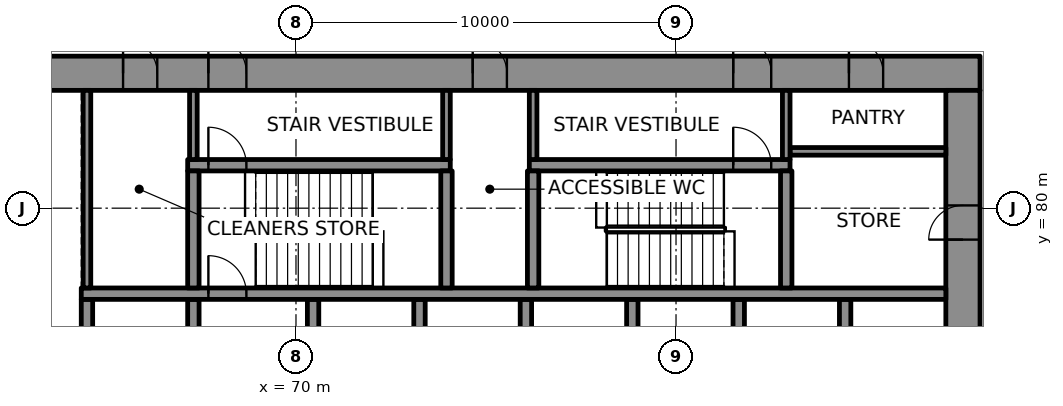
"""IFC4 building model, lengths in metres.
Left out: names, types, materials, properties, quantities, classifications, styles, units other than length and angle.
Written with IfcOpenShell. Run it as: python <this file> out.ifc"""

import sys

from ifc_helpers import new_model, si_unit, direction, frame, frame_2d, origin, place, context, subcontext, project, spatial, rectangle, extrude, element, fill, save


model = new_model("IFC4")
c1 = context("Model", 3, precision=1e-05, world=origin(), true_north=direction((0.0, 1.0)))
c2 = subcontext(c1, "Body", "Model", "MODEL_VIEW")
j1 = project(units=[si_unit("LENGTHUNIT", "METRE"), si_unit("PLANEANGLEUNIT", "RADIAN")], contexts=[c1])
p1 = place(None, origin())
s1 = spatial("IfcSite", under=j1, at=p1, CompositionType="ELEMENT")
p2 = place(p1, origin())
s2 = spatial("IfcBuilding", under=s1, at=p2, CompositionType="ELEMENT")
p3 = place(p2, frame((0.0, 0.0, 61.0)))
s3 = spatial("IfcBuildingStorey", under=s2, at=p3, CompositionType="ELEMENT", Elevation=61.0)
p4 = place(p3, frame((62.0, 83.55, 0.0), z_axis=(0.0, 0.0, 1.0), x_axis=(1.0, 0.0, 0.0)))
e1 = element("IfcWall", 1, at=p4, inside=s3, PredefinedType="SHEAR", context=c2, shape_type="SweptSolid", body=[
    extrude(rectangle(XDim=26.0, YDim=0.9, at=frame_2d((13.0, 0.0))), origin(), (0.0, 0.0, 1.0), 4.0),
])
p5 = place(p4, frame((5.695, 0.0, 0.0)))
e2 = element("IfcOpeningElement", 2, at=p5, cuts=e1, PredefinedType="OPENING", context=c2, shape_type="SweptSolid", body=[
    extrude(rectangle(XDim=1.0, YDim=2.1, at=frame_2d((0.5, 1.05))), frame((0.0, 0.46, 0.0), z_axis=(0.0, -1.0, 0.0), x_axis=(1.0, 0.0, 0.0)), (0.0, 0.0, 1.0), 0.92),
])
p6 = place(p4, frame((19.505, 0.0, 0.0)))
e3 = element("IfcOpeningElement", 3, at=p6, cuts=e1, PredefinedType="OPENING", context=c2, shape_type="SweptSolid", body=[
    extrude(rectangle(XDim=1.0, YDim=2.1, at=frame_2d((0.5, 1.05))), frame((0.0, 0.46, 0.0), z_axis=(0.0, -1.0, 0.0), x_axis=(1.0, 0.0, 0.0)), (0.0, 0.0, 1.0), 0.92),
])
p7 = place(p4, frame((3.45, 0.0, 0.0)))
e4 = element("IfcOpeningElement", 4, at=p7, cuts=e1, PredefinedType="OPENING", context=c2, shape_type="SweptSolid", body=[
    extrude(rectangle(XDim=0.9, YDim=2.1, at=frame_2d((0.45, 1.05))), frame((0.0, 0.46, 0.0), z_axis=(0.0, -1.0, 0.0), x_axis=(1.0, 0.0, 0.0)), (0.0, 0.0, 1.0), 0.92),
])
p8 = place(p4, frame((12.65, 0.0, 0.0)))
e5 = element("IfcOpeningElement", 5, at=p8, cuts=e1, PredefinedType="OPENING", context=c2, shape_type="SweptSolid", body=[
    extrude(rectangle(XDim=0.9, YDim=2.1, at=frame_2d((0.45, 1.05))), frame((0.0, 0.46, 0.0), z_axis=(0.0, -1.0, 0.0), x_axis=(1.0, 0.0, 0.0)), (0.0, 0.0, 1.0), 0.92),
])
p9 = place(p4, frame((22.55, 0.0, 0.0)))
e6 = element("IfcOpeningElement", 6, at=p9, cuts=e1, PredefinedType="OPENING", context=c2, shape_type="SweptSolid", body=[
    extrude(rectangle(XDim=0.9, YDim=2.1, at=frame_2d((0.45, 1.05))), frame((0.0, 0.46, 0.0), z_axis=(0.0, -1.0, 0.0), x_axis=(1.0, 0.0, 0.0)), (0.0, 0.0, 1.0), 0.92),
])
p10 = place(p3, frame((87.55, 66.9, 0.0), z_axis=(0.0, 0.0, 1.0), x_axis=(0.0, 1.0, 0.0)))
e7 = element("IfcWall", 7, at=p10, inside=s3, PredefinedType="SHEAR", context=c2, shape_type="SweptSolid", body=[
    extrude(rectangle(XDim=16.2, YDim=0.9, at=frame_2d((8.1, 0.0))), origin(), (0.0, 0.0, 1.0), 4.0),
])
p11 = place(p10, frame((5.5, 0.0, 0.0)))
e8 = element("IfcOpeningElement", 8, at=p11, cuts=e7, PredefinedType="OPENING", context=c2, shape_type="SweptSolid", body=[
    extrude(rectangle(XDim=1.8, YDim=2.1, at=frame_2d((0.9, 1.05))), frame((0.0, 0.46, 0.0), z_axis=(0.0, -1.0, 0.0), x_axis=(1.0, 0.0, 0.0)), (0.0, 0.0, 1.0), 0.92),
])
p12 = place(p10, frame((12.272, 0.0, 0.0)))
e9 = element("IfcOpeningElement", 9, at=p12, cuts=e7, PredefinedType="OPENING", context=c2, shape_type="SweptSolid", body=[
    extrude(rectangle(XDim=0.9, YDim=2.1, at=frame_2d((0.45, 1.05))), frame((0.0, 0.46, 0.0), z_axis=(0.0, -1.0, 0.0), x_axis=(1.0, 0.0, 0.0)), (0.0, 0.0, 1.0), 0.92),
])
for number, where, z_axis, x_axis in (
    (10, (64.5, 75.0, 0.0), (0.0, 0.0, 1.0), (0.0, 1.0, 0.0)),
    (11, (67.3, 75.0, 0.0), (0.0, 0.0, 1.0), (0.0, 1.0, 0.0)),
):
    element("IfcWall", number, at=place(p3, frame(where, z_axis=z_axis, x_axis=x_axis)), inside=s3, PredefinedType="SHEAR", context=c2, shape_type="SweptSolid", body=[
        extrude(rectangle(XDim=2.6, YDim=0.3, at=frame_2d((1.3, 0.0))), origin(), (0.0, 0.0, 1.0), 4.0),
    ])
p13 = place(p3, frame((70.45, 75.0, 0.0), z_axis=(0.0, 0.0, 1.0), x_axis=(0.0, 1.0, 0.0)))
e12 = element("IfcWall", 12, at=p13, inside=s3, PredefinedType="SHEAR", context=c2, shape_type="SweptSolid", body=[
    extrude(rectangle(XDim=2.6, YDim=0.3, at=frame_2d((1.3, 0.0))), origin(), (0.0, 0.0, 1.0), 4.0),
])
p14 = place(p13, frame((0.15, 0.0, 0.0)))
e13 = element("IfcOpeningElement", 13, at=p14, cuts=e12, PredefinedType="OPENING", context=c2, shape_type="SweptSolid", body=[
    extrude(rectangle(XDim=1.1, YDim=2.1, at=frame_2d((0.55, 1.05))), frame((0.0, 0.16, 0.0), z_axis=(0.0, -1.0, 0.0), x_axis=(1.0, 0.0, 0.0)), (0.0, 0.0, 1.0), 0.32),
])
for number, where, z_axis, x_axis in (
    (14, (73.25, 75.0, 0.0), (0.0, 0.0, 1.0), (0.0, 1.0, 0.0)),
    (15, (76.05, 75.0, 0.0), (0.0, 0.0, 1.0), (0.0, 1.0, 0.0)),
    (16, (78.85, 75.0, 0.0), (0.0, 0.0, 1.0), (0.0, 1.0, 0.0)),
    (17, (81.65, 75.0, 0.0), (0.0, 0.0, 1.0), (0.0, 1.0, 0.0)),
    (18, (84.45, 75.0, 0.0), (0.0, 0.0, 1.0), (0.0, 1.0, 0.0)),
):
    element("IfcWall", number, at=place(p3, frame(where, z_axis=z_axis, x_axis=x_axis)), inside=s3, PredefinedType="SHEAR", context=c2, shape_type="SweptSolid", body=[
        extrude(rectangle(XDim=2.6, YDim=0.3, at=frame_2d((1.3, 0.0))), origin(), (0.0, 0.0, 1.0), 4.0),
    ])
p15 = place(p3, frame((64.35, 77.75, 0.0), z_axis=(0.0, 0.0, 1.0), x_axis=(1.0, 0.0, 0.0)))
e19 = element("IfcWall", 19, at=p15, inside=s3, PredefinedType="SHEAR", context=c2, shape_type="SweptSolid", body=[
    extrude(rectangle(XDim=22.75, YDim=0.3, at=frame_2d((11.375, 0.0))), origin(), (0.0, 0.0, 1.0), 4.0),
])
p16 = place(p15, frame((3.345, 0.0, 0.0)))
e20 = element("IfcOpeningElement", 20, at=p16, cuts=e19, PredefinedType="OPENING", context=c2, shape_type="SweptSolid", body=[
    extrude(rectangle(XDim=1.0, YDim=2.1, at=frame_2d((0.5, 1.05))), frame((0.0, 0.16, 0.0), z_axis=(0.0, -1.0, 0.0), x_axis=(1.0, 0.0, 0.0)), (0.0, 0.0, 1.0), 0.32),
])
p17 = place(p3, frame((67.15, 81.13, 0.0), z_axis=(0.0, 0.0, 1.0), x_axis=(1.0, 0.0, 0.0)))
e21 = element("IfcWall", 21, at=p17, inside=s3, PredefinedType="SHEAR", context=c2, shape_type="SweptSolid", body=[
    extrude(rectangle(XDim=6.91, YDim=0.3, at=frame_2d((3.455, 0.0))), origin(), (0.0, 0.0, 1.0), 4.0),
])
p18 = place(p17, frame((0.545, 0.0, 0.0)))
e22 = element("IfcOpeningElement", 22, at=p18, cuts=e21, PredefinedType="OPENING", context=c2, shape_type="SweptSolid", body=[
    extrude(rectangle(XDim=1.0, YDim=2.1, at=frame_2d((0.5, 1.05))), frame((0.0, 0.16, 0.0), z_axis=(0.0, -1.0, 0.0), x_axis=(1.0, 0.0, 0.0)), (0.0, 0.0, 1.0), 0.32),
])
p19 = place(p3, frame((76.14, 81.13, 0.0), z_axis=(0.0, 0.0, 1.0), x_axis=(1.0, 0.0, 0.0)))
e23 = element("IfcWall", 23, at=p19, inside=s3, PredefinedType="SHEAR", context=c2, shape_type="SweptSolid", body=[
    extrude(rectangle(XDim=6.86, YDim=0.3, at=frame_2d((3.43, 0.0))), origin(), (0.0, 0.0, 1.0), 4.0),
])
p20 = place(p19, frame((5.365, 0.0, 0.0)))
e24 = element("IfcOpeningElement", 24, at=p20, cuts=e23, PredefinedType="OPENING", context=c2, shape_type="SweptSolid", body=[
    extrude(rectangle(XDim=1.0, YDim=2.1, at=frame_2d((0.5, 1.05))), frame((0.0, 0.16, 0.0), z_axis=(0.0, -1.0, 0.0), x_axis=(1.0, 0.0, 0.0)), (0.0, 0.0, 1.0), 0.32),
])
for number, where, z_axis, x_axis in (
    (25, (67.3, 77.9, 0.0), (0.0, 0.0, 1.0), (0.0, 1.0, 0.0)),
    (26, (73.96, 77.9, 0.0), (0.0, 0.0, 1.0), (0.0, 1.0, 0.0)),
    (27, (76.24, 77.9, 0.0), (0.0, 0.0, 1.0), (0.0, 1.0, 0.0)),
    (28, (82.9, 77.9, 0.0), (0.0, 0.0, 1.0), (0.0, 1.0, 0.0)),
):
    element("IfcWall", number, at=place(p3, frame(where, z_axis=z_axis, x_axis=x_axis)), inside=s3, PredefinedType="SHEAR", context=c2, shape_type="SweptSolid", body=[
        extrude(rectangle(XDim=3.08, YDim=0.3, at=frame_2d((1.54, 0.0))), origin(), (0.0, 0.0, 1.0), 4.0),
    ])
p21 = place(p3, frame((83.0, 81.495, 0.0), z_axis=(0.0, 0.0, 1.0), x_axis=(1.0, 0.0, 0.0)))
e29 = element("IfcWall", 29, at=p21, inside=s3, PredefinedType="PARTITIONING", context=c2, shape_type="SweptSolid", body=[
    extrude(rectangle(XDim=4.1, YDim=0.2, at=frame_2d((2.05, 0.0))), origin(), (0.0, 0.0, 1.0), 4.0),
])
p22 = place(p3, frame((64.5, 77.9, 0.0), z_axis=(0.0, 0.0, 1.0), x_axis=(0.0, 1.0, 0.0)))
e30 = element("IfcWall", 30, at=p22, inside=s3, PredefinedType="PARTITIONING", context=c2, shape_type="SweptSolid", body=[
    extrude(rectangle(XDim=5.2, YDim=0.2, at=frame_2d((2.6, 0.0))), origin(), (0.0, 0.0, 1.0), 4.0),
])
for number, where, z_axis, x_axis in (
    (31, (67.3, 81.28, 0.0), (0.0, 0.0, 1.0), (0.0, 1.0, 0.0)),
    (32, (73.96, 81.28, 0.0), (0.0, 0.0, 1.0), (0.0, 1.0, 0.0)),
    (33, (76.24, 81.28, 0.0), (0.0, 0.0, 1.0), (0.0, 1.0, 0.0)),
    (34, (82.9, 81.28, 0.0), (0.0, 0.0, 1.0), (0.0, 1.0, 0.0)),
):
    element("IfcWall", number, at=place(p3, frame(where, z_axis=z_axis, x_axis=x_axis)), inside=s3, PredefinedType="PARTITIONING", context=c2, shape_type="SweptSolid", body=[
        extrude(rectangle(XDim=1.82, YDim=0.2, at=frame_2d((0.91, 0.0))), origin(), (0.0, 0.0, 1.0), 4.0),
    ])
p23 = place(p16, origin())
e35 = element("IfcDoor", 35, at=p23, inside=s3, OperationType="SINGLE_SWING_LEFT", PredefinedType="DOOR", context=c2, shape_type="SweptSolid", body=[
    extrude(rectangle(XDim=1.0, YDim=2.1, at=frame_2d((0.5, 1.05))), frame((0.0, 0.025, 0.0), z_axis=(0.0, -1.0, 0.0), x_axis=(1.0, 0.0, 0.0)), (0.0, 0.0, 1.0), 0.05),
])
fill(e20, e35)
p24 = place(p18, origin())
e36 = element("IfcDoor", 36, at=p24, inside=s3, OperationType="SINGLE_SWING_RIGHT", PredefinedType="DOOR", context=c2, shape_type="SweptSolid", body=[
    extrude(rectangle(XDim=1.0, YDim=2.1, at=frame_2d((0.5, 1.05))), frame((0.0, 0.025, 0.0), z_axis=(0.0, -1.0, 0.0), x_axis=(1.0, 0.0, 0.0)), (0.0, 0.0, 1.0), 0.05),
])
fill(e22, e36)
p25 = place(p5, origin())
e37 = element("IfcDoor", 37, at=p25, inside=s3, OperationType="SINGLE_SWING_LEFT", PredefinedType="DOOR", context=c2, shape_type="SweptSolid", body=[
    extrude(rectangle(XDim=1.0, YDim=2.1, at=frame_2d((0.5, 1.05))), frame((0.0, 0.17, 0.0), z_axis=(0.0, -1.0, 0.0), x_axis=(1.0, 0.0, 0.0)), (0.0, 0.0, 1.0), 0.34),
])
fill(e2, e37)
p26 = place(p20, origin())
e38 = element("IfcDoor", 38, at=p26, inside=s3, OperationType="SINGLE_SWING_RIGHT", PredefinedType="DOOR", context=c2, shape_type="SweptSolid", body=[
    extrude(rectangle(XDim=1.0, YDim=2.1, at=frame_2d((0.5, 1.05))), frame((0.0, 0.025, 0.0), z_axis=(0.0, -1.0, 0.0), x_axis=(1.0, 0.0, 0.0)), (0.0, 0.0, 1.0), 0.05),
])
fill(e24, e38)
p27 = place(p6, origin())
e39 = element("IfcDoor", 39, at=p27, inside=s3, OperationType="SINGLE_SWING_LEFT", PredefinedType="DOOR", context=c2, shape_type="SweptSolid", body=[
    extrude(rectangle(XDim=1.0, YDim=2.1, at=frame_2d((0.5, 1.05))), frame((0.0, 0.17, 0.0), z_axis=(0.0, -1.0, 0.0), x_axis=(1.0, 0.0, 0.0)), (0.0, 0.0, 1.0), 0.34),
])
fill(e3, e39)
p28 = place(p7, origin())
e40 = element("IfcDoor", 40, at=p28, inside=s3, OperationType="SINGLE_SWING_RIGHT", PredefinedType="DOOR", context=c2, shape_type="SweptSolid", body=[
    extrude(rectangle(XDim=0.9, YDim=2.1, at=frame_2d((0.45, 1.05))), frame((0.0, 0.17, 0.0), z_axis=(0.0, -1.0, 0.0), x_axis=(1.0, 0.0, 0.0)), (0.0, 0.0, 1.0), 0.34),
])
fill(e4, e40)
p29 = place(p8, origin())
e41 = element("IfcDoor", 41, at=p29, inside=s3, OperationType="SINGLE_SWING_LEFT", PredefinedType="DOOR", context=c2, shape_type="SweptSolid", body=[
    extrude(rectangle(XDim=0.9, YDim=2.1, at=frame_2d((0.45, 1.05))), frame((0.0, 0.17, 0.0), z_axis=(0.0, -1.0, 0.0), x_axis=(1.0, 0.0, 0.0)), (0.0, 0.0, 1.0), 0.34),
])
fill(e5, e41)
p30 = place(p12, origin())
e42 = element("IfcDoor", 42, at=p30, inside=s3, OperationType="SINGLE_SWING_RIGHT", PredefinedType="DOOR", context=c2, shape_type="SweptSolid", body=[
    extrude(rectangle(XDim=0.9, YDim=2.1, at=frame_2d((0.45, 1.05))), frame((0.0, 0.17, 0.0), z_axis=(0.0, -1.0, 0.0), x_axis=(1.0, 0.0, 0.0)), (0.0, 0.0, 1.0), 0.34),
])
fill(e9, e42)
p31 = place(p9, origin())
e43 = element("IfcDoor", 43, at=p31, inside=s3, OperationType="SINGLE_SWING_LEFT", PredefinedType="DOOR", context=c2, shape_type="SweptSolid", body=[
    extrude(rectangle(XDim=0.9, YDim=2.1, at=frame_2d((0.45, 1.05))), frame((0.0, 0.17, 0.0), z_axis=(0.0, -1.0, 0.0), x_axis=(1.0, 0.0, 0.0)), (0.0, 0.0, 1.0), 0.34),
])
fill(e6, e43)
save(model, sys.argv[1])
